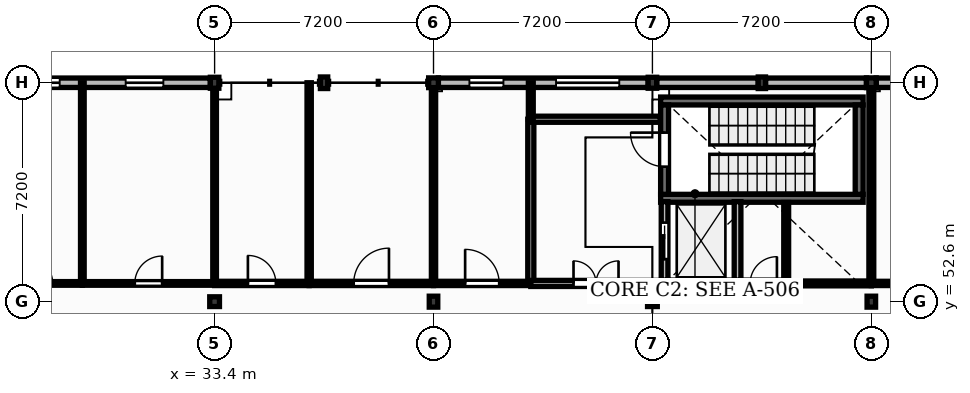
"""IFC4 building model, lengths in metres.
Left out: names, types, materials, properties, quantities, classifications, styles, units other than length and angle.
Written with IfcOpenShell. Run it as: python <this file> out.ifc"""

import sys

from ifc_helpers import new_model, si_unit, direction, frame, frame_2d, origin, origin_2d, place, context, subcontext, project, spatial, rectangle, extrude, element, fill, save


model = new_model("IFC4")
c1 = context("Model", 3, precision=1e-05, world=origin(), true_north=direction((0.0, 1.0)))
c2 = subcontext(c1, "Body", "Model", "MODEL_VIEW")
j1 = project(units=[si_unit("LENGTHUNIT", "METRE"), si_unit("PLANEANGLEUNIT", "RADIAN")], contexts=[c1])
p1 = place(None, origin())
s1 = spatial("IfcSite", under=j1, at=p1, CompositionType="ELEMENT")
p2 = place(p1, origin())
s2 = spatial("IfcBuilding", under=s1, at=p2, CompositionType="ELEMENT")
p3 = place(p2, frame((0.0, 0.0, 9.0)))
s3 = spatial("IfcBuildingStorey", under=s2, at=p3, CompositionType="ELEMENT", Elevation=9.0)
p4 = place(p3, frame((33.4, 52.6, 0.0), z_axis=(0.0, 0.0, 1.0), x_axis=(1.0, 0.0, 0.0)))
e1 = element("IfcColumn", 1, at=p4, inside=s3, PredefinedType="COLUMN", context=c2, shape_type="SweptSolid", body=[
    extrude(rectangle(XDim=0.32, YDim=0.32, at=origin_2d()), origin(), (0.0, 0.0, 1.0), 3.99),
])
for number, where, z_axis, x_axis in (
    (2, (33.4, 59.8, 0.0), (0.0, 0.0, 1.0), (1.0, 0.0, 0.0)),
    (3, (40.6, 52.6, 0.0), (0.0, 0.0, 1.0), (1.0, 0.0, 0.0)),
):
    element("IfcColumn", number, at=place(p3, frame(where, z_axis=z_axis, x_axis=x_axis)), inside=s3, PredefinedType="COLUMN", context=c2, shape_type="SweptSolid", body=[
        extrude(rectangle(XDim=0.28, YDim=0.36, at=origin_2d()), origin(), (0.0, 0.0, 1.0), 3.99),
    ])
for number, where, z_axis, x_axis in (
    (4, (40.6, 59.8, 0.0), (0.0, 0.0, 1.0), (1.0, 0.0, 0.0)),
    (5, (47.8, 52.6, 0.0), (0.0, 0.0, 1.0), (1.0, 0.0, 0.0)),
):
    element("IfcColumn", number, at=place(p3, frame(where, z_axis=z_axis, x_axis=x_axis)), inside=s3, PredefinedType="COLUMN", context=c2, shape_type="SweptSolid", body=[
        extrude(rectangle(XDim=0.32, YDim=0.32, at=origin_2d()), origin(), (0.0, 0.0, 1.0), 3.99),
    ])
for number, where, z_axis, x_axis in (
    (6, (47.8, 59.8, 0.0), (0.0, 0.0, 1.0), (1.0, 0.0, 0.0)),
    (7, (55.0, 52.6, 0.0), (0.0, 0.0, 1.0), (1.0, 0.0, 0.0)),
):
    element("IfcColumn", number, at=place(p3, frame(where, z_axis=z_axis, x_axis=x_axis)), inside=s3, PredefinedType="COLUMN", context=c2, shape_type="SweptSolid", body=[
        extrude(rectangle(XDim=0.28, YDim=0.36, at=origin_2d()), origin(), (0.0, 0.0, 1.0), 3.99),
    ])
p5 = place(p3, frame((55.0, 59.8, 0.0), z_axis=(0.0, 0.0, 1.0), x_axis=(1.0, 0.0, 0.0)))
e8 = element("IfcColumn", 8, at=p5, inside=s3, PredefinedType="COLUMN", context=c2, shape_type="SweptSolid", body=[
    extrude(rectangle(XDim=0.32, YDim=0.32, at=origin_2d()), origin(), (0.0, 0.0, 1.0), 3.99),
])
for number, where, z_axis, x_axis in (
    (9, (37.0, 59.8, 0.0), (0.0, 0.0, 1.0), (1.0, 0.0, 0.0)),
    (10, (51.4, 59.8, 0.0), (0.0, 0.0, 1.0), (1.0, 0.0, 0.0)),
):
    element("IfcColumn", number, at=place(p3, frame(where, z_axis=z_axis, x_axis=x_axis)), inside=s3, PredefinedType="PILASTER", context=c2, shape_type="SweptSolid", body=[
        extrude(rectangle(XDim=0.24, YDim=0.38, at=origin_2d()), origin(), (0.0, 0.0, 1.0), 3.99),
    ])
p6 = place(p3, frame((26.36, 59.8, 0.0), z_axis=(0.0, 0.0, 1.0), x_axis=(1.0, 0.0, 0.0)))
e11 = element("IfcWall", 11, at=p6, inside=s3, PredefinedType="SOLIDWALL", context=c2, shape_type="SweptSolid", body=[
    extrude(rectangle(XDim=6.9, YDim=0.31, at=frame_2d((3.45, 0.0))), origin(), (0.0, 0.0, 1.0), 3.53),
])
p7 = place(p6, frame((0.865, 0.0, 1.0)))
e12 = element("IfcOpeningElement", 12, at=p7, cuts=e11, PredefinedType="OPENING", context=c2, shape_type="SweptSolid", body=[
    extrude(rectangle(XDim=1.08, YDim=1.95, at=frame_2d((0.54, 0.975))), frame((0.0, 0.165, 0.0), z_axis=(0.0, -1.0, 0.0), x_axis=(1.0, 0.0, 0.0)), (0.0, 0.0, 1.0), 0.33),
])
p8 = place(p6, frame((4.115, 0.0, 1.0)))
e13 = element("IfcOpeningElement", 13, at=p8, cuts=e11, PredefinedType="OPENING", context=c2, shape_type="SweptSolid", body=[
    extrude(rectangle(XDim=1.24, YDim=1.8, at=frame_2d((0.62, 0.9))), frame((0.0, 0.165, 0.0), z_axis=(0.0, -1.0, 0.0), x_axis=(1.0, 0.0, 0.0)), (0.0, 0.0, 1.0), 0.33),
])
p9 = place(p3, frame((40.76, 59.8, 0.0), z_axis=(0.0, 0.0, 1.0), x_axis=(1.0, 0.0, 0.0)))
e14 = element("IfcWall", 14, at=p9, inside=s3, PredefinedType="SOLIDWALL", context=c2, shape_type="SweptSolid", body=[
    extrude(rectangle(XDim=6.9, YDim=0.31, at=frame_2d((3.45, 0.0))), origin(), (0.0, 0.0, 1.0), 3.53),
])
p10 = place(p9, frame((1.02, 0.0, 1.05)))
e15 = element("IfcOpeningElement", 15, at=p10, cuts=e14, PredefinedType="OPENING", context=c2, shape_type="SweptSolid", body=[
    extrude(rectangle(XDim=1.12, YDim=1.65, at=frame_2d((0.56, 0.825))), frame((0.0, 0.165, 0.0), z_axis=(0.0, -1.0, 0.0), x_axis=(1.0, 0.0, 0.0)), (0.0, 0.0, 1.0), 0.33),
])
p11 = place(p9, frame((3.87, 0.0, 1.0)))
e16 = element("IfcOpeningElement", 16, at=p11, cuts=e14, PredefinedType="OPENING", context=c2, shape_type="SweptSolid", body=[
    extrude(rectangle(XDim=2.08, YDim=1.8, at=frame_2d((1.04, 0.9))), frame((0.0, 0.165, 0.0), z_axis=(0.0, -1.0, 0.0), x_axis=(1.0, 0.0, 0.0)), (0.0, 0.0, 1.0), 0.33),
])
p12 = place(p3, frame((47.94, 59.8, 0.0), z_axis=(0.0, 0.0, 1.0), x_axis=(1.0, 0.0, 0.0)))
e17 = element("IfcWall", 17, at=p12, inside=s3, PredefinedType="SOLIDWALL", context=c2, shape_type="SweptSolid", body=[
    extrude(rectangle(XDim=3.34, YDim=0.31, at=frame_2d((1.67, 0.0))), origin(), (0.0, 0.0, 1.0), 3.53),
])
p13 = place(p3, frame((51.52, 59.8, 0.0), z_axis=(0.0, 0.0, 1.0), x_axis=(1.0, 0.0, 0.0)))
e18 = element("IfcWall", 18, at=p13, inside=s3, PredefinedType="SOLIDWALL", context=c2, shape_type="SweptSolid", body=[
    extrude(rectangle(XDim=3.32, YDim=0.31, at=frame_2d((1.66, 0.0))), origin(), (0.0, 0.0, 1.0), 3.53),
])
p14 = place(p3, frame((55.16, 59.8, 0.0), z_axis=(0.0, 0.0, 1.0), x_axis=(1.0, 0.0, 0.0)))
e19 = element("IfcWall", 19, at=p14, inside=s3, PredefinedType="SOLIDWALL", context=c2, shape_type="SweptSolid", body=[
    extrude(rectangle(XDim=3.32, YDim=0.31, at=frame_2d((1.66, 0.0))), origin(), (0.0, 0.0, 1.0), 3.52),
])
p15 = place(p14, frame((0.935, 0.0, 1.35)))
e20 = element("IfcOpeningElement", 20, at=p15, cuts=e19, PredefinedType="OPENING", context=c2, shape_type="SweptSolid", body=[
    extrude(rectangle(XDim=1.45, YDim=1.4, at=frame_2d((0.725, 0.7))), frame((0.0, 0.165, 0.0), z_axis=(0.0, -1.0, 0.0), x_axis=(1.0, 0.0, 0.0)), (0.0, 0.0, 1.0), 0.33),
])
for number, where, z_axis, x_axis in (
    (21, (48.07, 56.0, 0.0), (0.0, 0.0, 1.0), (1.0, 0.0, 0.0)),
    (22, (48.07, 59.2, 0.0), (0.0, 0.0, 1.0), (1.0, 0.0, 0.0)),
):
    element("IfcWall", number, at=place(p3, frame(where, z_axis=z_axis, x_axis=x_axis)), inside=s3, PredefinedType="SHEAR", context=c2, shape_type="SweptSolid", body=[
        extrude(rectangle(XDim=6.66, YDim=0.26, at=frame_2d((3.33, 0.0))), origin(), (0.0, 0.0, 1.0), 3.95),
    ])
p16 = place(p3, frame((48.2, 56.13, 0.0), z_axis=(0.0, 0.0, 1.0), x_axis=(0.0, 1.0, 0.0)))
e23 = element("IfcWall", 23, at=p16, inside=s3, PredefinedType="SHEAR", context=c2, shape_type="SweptSolid", body=[
    extrude(rectangle(XDim=2.94, YDim=0.26, at=frame_2d((1.47, 0.0))), origin(), (0.0, 0.0, 1.0), 3.95),
])
p17 = place(p16, frame((0.91, 0.0, 0.0)))
e24 = element("IfcOpeningElement", 24, at=p17, cuts=e23, PredefinedType="OPENING", context=c2, shape_type="SweptSolid", body=[
    extrude(rectangle(XDim=1.12, YDim=2.1, at=frame_2d((0.56, 1.05))), frame((0.0, 0.14, 0.0), z_axis=(0.0, -1.0, 0.0), x_axis=(1.0, 0.0, 0.0)), (0.0, 0.0, 1.0), 0.28),
])
p18 = place(p3, frame((54.6, 56.13, 0.0), z_axis=(0.0, 0.0, 1.0), x_axis=(0.0, 1.0, 0.0)))
e25 = element("IfcWall", 25, at=p18, inside=s3, PredefinedType="SHEAR", context=c2, shape_type="SweptSolid", body=[
    extrude(rectangle(XDim=2.94, YDim=0.26, at=frame_2d((1.47, 0.0))), origin(), (0.0, 0.0, 1.0), 3.95),
])
p19 = place(p3, frame((48.2, 53.2, 0.0), z_axis=(0.0, 0.0, 1.0), x_axis=(1.0, 0.0, 0.0)))
e26 = element("IfcWall", 26, at=p19, inside=s3, PredefinedType="SOLIDWALL", context=c2, shape_type="SweptSolid", body=[
    extrude(rectangle(XDim=2.4, YDim=0.22, at=frame_2d((1.2, 0.0))), origin(), (0.0, 0.0, 1.0), 3.95),
])
p20 = place(p3, frame((48.2, 53.31, 0.0), z_axis=(0.0, 0.0, 1.0), x_axis=(0.0, 1.0, 0.0)))
e27 = element("IfcWall", 27, at=p20, inside=s3, PredefinedType="SOLIDWALL", context=c2, shape_type="SweptSolid", body=[
    extrude(rectangle(XDim=2.58, YDim=0.22, at=frame_2d((1.29, 0.0))), origin(), (0.0, 0.0, 1.0), 3.95),
])
p21 = place(p20, frame((0.69, 0.0, 0.0)))
e28 = element("IfcOpeningElement", 28, at=p21, cuts=e27, PredefinedType="OPENING", context=c2, shape_type="SweptSolid", body=[
    extrude(rectangle(XDim=1.2, YDim=2.15, at=frame_2d((0.6, 1.075))), frame((0.0, 0.12, 0.0), z_axis=(0.0, -1.0, 0.0), x_axis=(1.0, 0.0, 0.0)), (0.0, 0.0, 1.0), 0.24),
])
p22 = place(p3, frame((50.6, 53.31, 0.0), z_axis=(0.0, 0.0, 1.0), x_axis=(0.0, 1.0, 0.0)))
e29 = element("IfcWall", 29, at=p22, inside=s3, PredefinedType="SOLIDWALL", context=c2, shape_type="SweptSolid", body=[
    extrude(rectangle(XDim=2.58, YDim=0.22, at=frame_2d((1.29, 0.0))), origin(), (0.0, 0.0, 1.0), 3.95),
])
p23 = place(p3, frame((26.2, 53.2, 0.0), z_axis=(0.0, 0.0, 1.0), x_axis=(1.0, 0.0, 0.0)))
e30 = element("IfcWall", 30, at=p23, inside=s3, PredefinedType="PLUMBINGWALL", context=c2, shape_type="SweptSolid", body=[
    extrude(rectangle(XDim=2.85, YDim=0.12, at=frame_2d((1.425, 0.0))), origin(), (0.0, 0.0, 1.0), 3.96),
])
p24 = place(p23, frame((0.975, 0.0, 0.0)))
e31 = element("IfcOpeningElement", 31, at=p24, cuts=e30, PredefinedType="OPENING", context=c2, shape_type="SweptSolid", body=[
    extrude(rectangle(XDim=0.9, YDim=2.1, at=frame_2d((0.45, 1.05))), frame((0.0, 0.07, 0.0), z_axis=(0.0, -1.0, 0.0), x_axis=(1.0, 0.0, 0.0)), (0.0, 0.0, 1.0), 0.14),
])
p25 = place(p3, frame((29.05, 53.27, 0.0), z_axis=(0.0, 0.0, 1.0), x_axis=(0.0, 1.0, 0.0)))
e32 = element("IfcWall", 32, at=p25, inside=s3, PredefinedType="PLUMBINGWALL", context=c2, shape_type="SweptSolid", body=[
    extrude(rectangle(XDim=6.53, YDim=0.12, at=frame_2d((3.265, 0.0))), origin(), (0.0, 0.0, 1.0), 3.96),
])
p26 = place(p3, frame((29.05, 53.2, 0.0), z_axis=(0.0, 0.0, 1.0), x_axis=(1.0, 0.0, 0.0)))
e33 = element("IfcWall", 33, at=p26, inside=s3, PredefinedType="PLUMBINGWALL", context=c2, shape_type="SweptSolid", body=[
    extrude(rectangle(XDim=4.35, YDim=0.12, at=frame_2d((2.175, 0.0))), origin(), (0.0, 0.0, 1.0), 3.96),
])
p27 = place(p26, frame((1.725, 0.0, 0.0)))
e34 = element("IfcOpeningElement", 34, at=p27, cuts=e33, PredefinedType="OPENING", context=c2, shape_type="SweptSolid", body=[
    extrude(rectangle(XDim=0.9, YDim=2.1, at=frame_2d((0.45, 1.05))), frame((0.0, 0.07, 0.0), z_axis=(0.0, -1.0, 0.0), x_axis=(1.0, 0.0, 0.0)), (0.0, 0.0, 1.0), 0.14),
])
p28 = place(p3, frame((33.4, 53.27, 0.0), z_axis=(0.0, 0.0, 1.0), x_axis=(0.0, 1.0, 0.0)))
e35 = element("IfcWall", 35, at=p28, inside=s3, PredefinedType="PLUMBINGWALL", context=c2, shape_type="SweptSolid", body=[
    extrude(rectangle(XDim=6.35, YDim=0.12, at=frame_2d((3.175, 0.0))), origin(), (0.0, 0.0, 1.0), 3.47),
])
p29 = place(p3, frame((33.4, 53.2, 0.0), z_axis=(0.0, 0.0, 1.0), x_axis=(1.0, 0.0, 0.0)))
e36 = element("IfcWall", 36, at=p29, inside=s3, PredefinedType="PARTITIONING", context=c2, shape_type="SweptSolid", body=[
    extrude(rectangle(XDim=3.11, YDim=0.14, at=frame_2d((1.555, 0.0))), origin(), (0.0, 0.0, 1.0), 3.96),
])
p30 = place(p29, frame((1.095, 0.0, 0.0)))
e37 = element("IfcOpeningElement", 37, at=p30, cuts=e36, PredefinedType="OPENING", context=c2, shape_type="SweptSolid", body=[
    extrude(rectangle(XDim=0.92, YDim=2.1, at=frame_2d((0.46, 1.05))), frame((0.0, 0.08, 0.0), z_axis=(0.0, -1.0, 0.0), x_axis=(1.0, 0.0, 0.0)), (0.0, 0.0, 1.0), 0.16),
])
p31 = place(p3, frame((36.51, 53.27, 0.0), z_axis=(0.0, 0.0, 1.0), x_axis=(0.0, 1.0, 0.0)))
e38 = element("IfcWall", 38, at=p31, inside=s3, PredefinedType="PARTITIONING", context=c2, shape_type="SweptSolid", body=[
    extrude(rectangle(XDim=6.53, YDim=0.14, at=frame_2d((3.265, 0.0))), origin(), (0.0, 0.0, 1.0), 3.96),
])
p32 = place(p3, frame((36.51, 53.2, 0.0), z_axis=(0.0, 0.0, 1.0), x_axis=(1.0, 0.0, 0.0)))
e39 = element("IfcWall", 39, at=p32, inside=s3, PredefinedType="PARTITIONING", context=c2, shape_type="SweptSolid", body=[
    extrude(rectangle(XDim=4.09, YDim=0.14, at=frame_2d((2.045, 0.0))), origin(), (0.0, 0.0, 1.0), 3.96),
])
p33 = place(p32, frame((1.465, 0.0, 0.0)))
e40 = element("IfcOpeningElement", 40, at=p33, cuts=e39, PredefinedType="OPENING", context=c2, shape_type="SweptSolid", body=[
    extrude(rectangle(XDim=1.16, YDim=2.1, at=frame_2d((0.58, 1.05))), frame((0.0, 0.08, 0.0), z_axis=(0.0, -1.0, 0.0), x_axis=(1.0, 0.0, 0.0)), (0.0, 0.0, 1.0), 0.16),
])
p34 = place(p3, frame((40.6, 53.27, 0.0), z_axis=(0.0, 0.0, 1.0), x_axis=(0.0, 1.0, 0.0)))
e41 = element("IfcWall", 41, at=p34, inside=s3, PredefinedType="PARTITIONING", context=c2, shape_type="SweptSolid", body=[
    extrude(rectangle(XDim=6.37, YDim=0.14, at=frame_2d((3.185, 0.0))), origin(), (0.0, 0.0, 1.0), 3.47),
])
p35 = place(p3, frame((40.6, 53.2, 0.0), z_axis=(0.0, 0.0, 1.0), x_axis=(1.0, 0.0, 0.0)))
e42 = element("IfcWall", 42, at=p35, inside=s3, PredefinedType="PARTITIONING", context=c2, shape_type="SweptSolid", body=[
    extrude(rectangle(XDim=3.2, YDim=0.14, at=frame_2d((1.6, 0.0))), origin(), (0.0, 0.0, 1.0), 3.96),
])
p36 = place(p35, frame((1.04, 0.0, 0.0)))
e43 = element("IfcOpeningElement", 43, at=p36, cuts=e42, PredefinedType="OPENING", context=c2, shape_type="SweptSolid", body=[
    extrude(rectangle(XDim=1.12, YDim=2.15, at=frame_2d((0.56, 1.075))), frame((0.0, 0.08, 0.0), z_axis=(0.0, -1.0, 0.0), x_axis=(1.0, 0.0, 0.0)), (0.0, 0.0, 1.0), 0.16),
])
p37 = place(p3, frame((43.8, 53.27, 0.0), z_axis=(0.0, 0.0, 1.0), x_axis=(0.0, 1.0, 0.0)))
e44 = element("IfcWall", 44, at=p37, inside=s3, PredefinedType="PARTITIONING", context=c2, shape_type="SweptSolid", body=[
    extrude(rectangle(XDim=5.33, YDim=0.2, at=frame_2d((2.665, 0.0))), origin(), (0.0, 0.0, 1.0), 3.96),
])
p38 = place(p3, frame((43.8, 53.2, 0.0), z_axis=(0.0, 0.0, 1.0), x_axis=(1.0, 0.0, 0.0)))
e45 = element("IfcWall", 45, at=p38, inside=s3, PredefinedType="PARTITIONING", context=c2, shape_type="SweptSolid", body=[
    extrude(rectangle(XDim=4.29, YDim=0.2, at=frame_2d((2.145, 0.0))), origin(), (0.0, 0.0, 1.0), 3.96),
])
p39 = place(p38, frame((1.405, 0.0, 0.0)))
e46 = element("IfcOpeningElement", 46, at=p39, cuts=e45, PredefinedType="OPENING", context=c2, shape_type="SweptSolid", body=[
    extrude(rectangle(XDim=1.48, YDim=2.25, at=frame_2d((0.74, 1.125))), frame((0.0, 0.11, 0.0), z_axis=(0.0, -1.0, 0.0), x_axis=(1.0, 0.0, 0.0)), (0.0, 0.0, 1.0), 0.22),
])
p40 = place(p3, frame((50.71, 53.2, 0.0), z_axis=(0.0, 0.0, 1.0), x_axis=(1.0, 0.0, 0.0)))
e47 = element("IfcWall", 47, at=p40, inside=s3, PredefinedType="SOLIDWALL", context=c2, shape_type="SweptSolid", body=[
    extrude(rectangle(XDim=1.49, YDim=0.22, at=frame_2d((0.745, 0.0))), origin(), (0.0, 0.0, 1.0), 3.96),
])
p41 = place(p40, frame((0.305, 0.0, 0.0)))
e48 = element("IfcOpeningElement", 48, at=p41, cuts=e47, PredefinedType="OPENING", context=c2, shape_type="SweptSolid", body=[
    extrude(rectangle(XDim=0.88, YDim=2.05, at=frame_2d((0.44, 1.025))), frame((0.0, 0.12, 0.0), z_axis=(0.0, -1.0, 0.0), x_axis=(1.0, 0.0, 0.0)), (0.0, 0.0, 1.0), 0.24),
])
p42 = place(p3, frame((55.0, 53.2, 0.0), z_axis=(0.0, 0.0, 1.0), x_axis=(1.0, 0.0, 0.0)))
e49 = element("IfcWall", 49, at=p42, inside=s3, PredefinedType="PARTITIONING", context=c2, shape_type="SweptSolid", body=[
    extrude(rectangle(XDim=4.457, YDim=0.14, at=frame_2d((2.229, 0.0))), origin(), (0.0, 0.0, 1.0), 3.96),
])
p43 = place(p42, frame((1.708, 0.0, 0.0)))
e50 = element("IfcOpeningElement", 50, at=p43, cuts=e49, PredefinedType="OPENING", context=c2, shape_type="SweptSolid", body=[
    extrude(rectangle(XDim=1.04, YDim=2.1, at=frame_2d((0.52, 1.05))), frame((0.0, 0.08, 0.0), z_axis=(0.0, -1.0, 0.0), x_axis=(1.0, 0.0, 0.0)), (0.0, 0.0, 1.0), 0.16),
])
p44 = place(p3, frame((52.2, 53.27, 0.0), z_axis=(0.0, 0.0, 1.0), x_axis=(0.0, 1.0, 0.0)))
e51 = element("IfcWall", 51, at=p44, inside=s3, PredefinedType="PARTITIONING", context=c2, shape_type="SweptSolid", body=[
    extrude(rectangle(XDim=2.59, YDim=0.16, at=frame_2d((1.295, 0.0))), origin(), (0.0, 0.0, 1.0), 3.96),
])
p45 = place(p3, frame((48.06, 58.6, 0.0), z_axis=(0.0, 0.0, 1.0), x_axis=(-1.0, 0.0, 0.0)))
e52 = element("IfcWall", 52, at=p45, inside=s3, PredefinedType="PARTITIONING", context=c2, shape_type="SweptSolid", body=[
    extrude(rectangle(XDim=4.26, YDim=0.2, at=frame_2d((2.13, 0.0))), origin(), (0.0, 0.0, 1.0), 3.96),
])
p46 = place(p3, frame((55.0, 53.2, 0.0), z_axis=(0.0, 0.0, 1.0), x_axis=(-1.0, 0.0, 0.0)))
e53 = element("IfcWall", 53, at=p46, inside=s3, PredefinedType="PARTITIONING", context=c2, shape_type="SweptSolid", body=[
    extrude(rectangle(XDim=2.8, YDim=0.16, at=frame_2d((1.4, 0.0))), origin(), (0.0, 0.0, 1.0), 3.96),
])
p47 = place(p3, frame((43.8, 58.6, 0.0), z_axis=(0.0, 0.0, 1.0), x_axis=(0.0, 1.0, 0.0)))
e54 = element("IfcWall", 54, at=p47, inside=s3, PredefinedType="PARTITIONING", context=c2, shape_type="SweptSolid", body=[
    extrude(rectangle(XDim=1.2, YDim=0.16, at=frame_2d((0.6, 0.0))), origin(), (0.0, 0.0, 1.0), 3.96),
])
p48 = place(p3, frame((55.0, 53.27, 0.0), z_axis=(0.0, 0.0, 1.0), x_axis=(0.0, 1.0, 0.0)))
e55 = element("IfcWall", 55, at=p48, inside=s3, PredefinedType="PARTITIONING", context=c2, shape_type="SweptSolid", body=[
    extrude(rectangle(XDim=6.37, YDim=0.16, at=frame_2d((3.185, 0.0))), origin(), (0.0, 0.0, 1.0), 3.47),
])
p49 = place(p7, origin())
e56 = element("IfcWindow", 56, at=p49, inside=s3, PartitioningType="SINGLE_PANEL", PredefinedType="WINDOW", context=c2, shape_type="SweptSolid", body=[
    extrude(rectangle(XDim=1.08, YDim=1.95, at=frame_2d((0.54, 0.975))), frame((0.0, 0.03, 0.0), z_axis=(0.0, -1.0, 0.0), x_axis=(1.0, 0.0, 0.0)), (0.0, 0.0, 1.0), 0.06),
])
fill(e12, e56)
p50 = place(p8, origin())
e57 = element("IfcWindow", 57, at=p50, inside=s3, PartitioningType="SINGLE_PANEL", PredefinedType="WINDOW", context=c2, shape_type="SweptSolid", body=[
    extrude(rectangle(XDim=1.24, YDim=1.8, at=frame_2d((0.62, 0.9))), frame((0.0, 0.03, 0.0), z_axis=(0.0, -1.0, 0.0), x_axis=(1.0, 0.0, 0.0)), (0.0, 0.0, 1.0), 0.06),
])
fill(e13, e57)
p51 = place(p10, origin())
e58 = element("IfcWindow", 58, at=p51, inside=s3, PartitioningType="SINGLE_PANEL", PredefinedType="WINDOW", context=c2, shape_type="SweptSolid", body=[
    extrude(rectangle(XDim=1.12, YDim=1.65, at=frame_2d((0.56, 0.825))), frame((0.0, 0.03, 0.0), z_axis=(0.0, -1.0, 0.0), x_axis=(1.0, 0.0, 0.0)), (0.0, 0.0, 1.0), 0.06),
])
fill(e15, e58)
p52 = place(p11, origin())
e59 = element("IfcWindow", 59, at=p52, inside=s3, PartitioningType="DOUBLE_PANEL_VERTICAL", PredefinedType="WINDOW", context=c2, shape_type="SweptSolid", body=[
    extrude(rectangle(XDim=2.08, YDim=1.8, at=frame_2d((1.04, 0.9))), frame((0.0, 0.03, 0.0), z_axis=(0.0, -1.0, 0.0), x_axis=(1.0, 0.0, 0.0)), (0.0, 0.0, 1.0), 0.06),
])
fill(e16, e59)
p53 = place(p21, origin())
e60 = element("IfcDoor", 60, at=p53, inside=s3, OperationType="SLIDING_TO_LEFT", PredefinedType="DOOR", context=c2, shape_type="SweptSolid", body=[
    extrude(rectangle(XDim=1.2, YDim=2.15, at=frame_2d((0.6, 1.075))), frame((0.0, 0.025, 0.0), z_axis=(0.0, -1.0, 0.0), x_axis=(1.0, 0.0, 0.0)), (0.0, 0.0, 1.0), 0.05),
])
fill(e28, e60)
p54 = place(p17, origin())
e61 = element("IfcDoor", 61, at=p54, inside=s3, OperationType="SINGLE_SWING_RIGHT", PredefinedType="DOOR", context=c2, shape_type="SweptSolid", body=[
    extrude(rectangle(XDim=1.12, YDim=2.1, at=frame_2d((0.56, 1.05))), frame((0.0, 0.025, 0.0), z_axis=(0.0, -1.0, 0.0), x_axis=(1.0, 0.0, 0.0)), (0.0, 0.0, 1.0), 0.05),
])
fill(e24, e61)
p55 = place(p39, origin())
e62 = element("IfcDoor", 62, at=p55, inside=s3, OperationType="DOUBLE_DOOR_SINGLE_SWING", PredefinedType="DOOR", context=c2, shape_type="SweptSolid", body=[
    extrude(rectangle(XDim=1.48, YDim=2.25, at=frame_2d((0.74, 1.125))), frame((0.0, 0.025, 0.0), z_axis=(0.0, -1.0, 0.0), x_axis=(1.0, 0.0, 0.0)), (0.0, 0.0, 1.0), 0.05),
])
fill(e46, e62)
p56 = place(p41, origin())
e63 = element("IfcDoor", 63, at=p56, inside=s3, OperationType="SINGLE_SWING_RIGHT", PredefinedType="DOOR", context=c2, shape_type="SweptSolid", body=[
    extrude(rectangle(XDim=0.88, YDim=2.05, at=frame_2d((0.44, 1.025))), frame((0.0, 0.025, 0.0), z_axis=(0.0, -1.0, 0.0), x_axis=(1.0, 0.0, 0.0)), (0.0, 0.0, 1.0), 0.05),
])
fill(e48, e63)
p57 = place(p24, origin())
e64 = element("IfcDoor", 64, at=p57, inside=s3, OperationType="SINGLE_SWING_LEFT", PredefinedType="DOOR", context=c2, shape_type="SweptSolid", body=[
    extrude(rectangle(XDim=0.9, YDim=2.1, at=frame_2d((0.45, 1.05))), frame((0.0, 0.025, 0.0), z_axis=(0.0, -1.0, 0.0), x_axis=(1.0, 0.0, 0.0)), (0.0, 0.0, 1.0), 0.05),
])
fill(e31, e64)
p58 = place(p27, origin())
e65 = element("IfcDoor", 65, at=p58, inside=s3, OperationType="SINGLE_SWING_RIGHT", PredefinedType="DOOR", context=c2, shape_type="SweptSolid", body=[
    extrude(rectangle(XDim=0.9, YDim=2.1, at=frame_2d((0.45, 1.05))), frame((0.0, 0.025, 0.0), z_axis=(0.0, -1.0, 0.0), x_axis=(1.0, 0.0, 0.0)), (0.0, 0.0, 1.0), 0.05),
])
fill(e34, e65)
p59 = place(p30, origin())
e66 = element("IfcDoor", 66, at=p59, inside=s3, OperationType="SINGLE_SWING_LEFT", PredefinedType="DOOR", context=c2, shape_type="SweptSolid", body=[
    extrude(rectangle(XDim=0.92, YDim=2.1, at=frame_2d((0.46, 1.05))), frame((0.0, 0.025, 0.0), z_axis=(0.0, -1.0, 0.0), x_axis=(1.0, 0.0, 0.0)), (0.0, 0.0, 1.0), 0.05),
])
fill(e37, e66)
p60 = place(p33, origin())
e67 = element("IfcDoor", 67, at=p60, inside=s3, OperationType="SINGLE_SWING_RIGHT", PredefinedType="DOOR", context=c2, shape_type="SweptSolid", body=[
    extrude(rectangle(XDim=1.16, YDim=2.1, at=frame_2d((0.58, 1.05))), frame((0.0, 0.025, 0.0), z_axis=(0.0, -1.0, 0.0), x_axis=(1.0, 0.0, 0.0)), (0.0, 0.0, 1.0), 0.05),
])
fill(e40, e67)
p61 = place(p36, origin())
e68 = element("IfcDoor", 68, at=p61, inside=s3, OperationType="SINGLE_SWING_LEFT", PredefinedType="DOOR", context=c2, shape_type="SweptSolid", body=[
    extrude(rectangle(XDim=1.12, YDim=2.15, at=frame_2d((0.56, 1.075))), frame((0.0, 0.025, 0.0), z_axis=(0.0, -1.0, 0.0), x_axis=(1.0, 0.0, 0.0)), (0.0, 0.0, 1.0), 0.05),
])
fill(e43, e68)
save(model, sys.argv[1])
